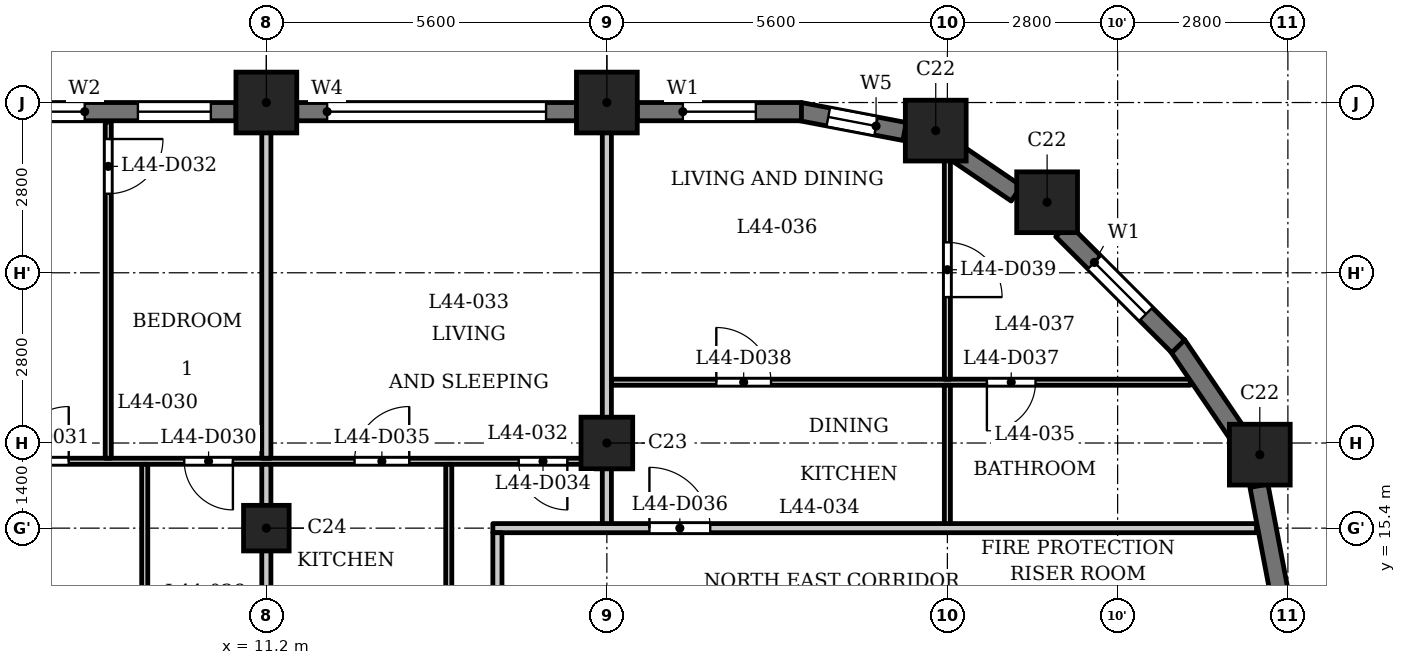
"""IFC4 building model, lengths in metres.
Left out: names, types, materials, properties, quantities, classifications, styles, units other than length and angle.
Written with IfcOpenShell. Run it as: python <this file> out.ifc"""

import sys

from ifc_helpers import new_model, si_unit, direction, frame, frame_2d, origin, origin_2d, place, context, subcontext, project, spatial, rectangle, extrude, element, fill, save


model = new_model("IFC4")
c1 = context("Model", 3, precision=1e-05, world=origin(), true_north=direction((0.0, 1.0)))
c2 = subcontext(c1, "Body", "Model", "MODEL_VIEW")
j1 = project(units=[si_unit("LENGTHUNIT", "METRE"), si_unit("PLANEANGLEUNIT", "RADIAN")], contexts=[c1])
p1 = place(None, origin())
s1 = spatial("IfcSite", under=j1, at=p1, CompositionType="ELEMENT")
p2 = place(p1, origin())
s2 = spatial("IfcBuilding", under=s1, at=p2, CompositionType="ELEMENT")
p3 = place(p2, frame((0.0, 0.0, 171.1)))
s3 = spatial("IfcBuildingStorey", under=s2, at=p3, CompositionType="ELEMENT", Elevation=171.1)
for number, where, z_axis, x_axis in (
    (1, (27.538, 16.609, 0.0), (0.0, 0.0, 1.0), (1.0, 0.0, 0.0)),
    (2, (24.04, 20.76, 0.0), (0.0, 0.0, 1.0), (1.0, 0.0, 0.0)),
    (3, (22.209, 21.938, 0.0), (0.0, 0.0, 1.0), (1.0, 0.0, 0.0)),
    (4, (16.8, 22.4, 0.0), (0.0, 0.0, 1.0), (1.0, 0.0, 0.0)),
    (5, (11.2, 22.4, 0.0), (0.0, 0.0, 1.0), (1.0, 0.0, 0.0)),
):
    element("IfcColumn", number, at=place(p3, frame(where, z_axis=z_axis, x_axis=x_axis)), inside=s3, PredefinedType="COLUMN", context=c2, shape_type="SweptSolid", body=[
        extrude(rectangle(XDim=1.0, YDim=1.0, at=origin_2d()), origin(), (0.0, 0.0, 1.0), 3.5),
    ])
p4 = place(p3, frame((16.8, 16.8, 0.0), z_axis=(0.0, 0.0, 1.0), x_axis=(1.0, 0.0, 0.0)))
e6 = element("IfcColumn", 6, at=p4, inside=s3, PredefinedType="COLUMN", context=c2, shape_type="SweptSolid", body=[
    extrude(rectangle(XDim=0.85, YDim=0.85, at=origin_2d()), origin(), (0.0, 0.0, 1.0), 3.5),
])
p5 = place(p3, frame((11.2, 15.4, 0.0), z_axis=(0.0, 0.0, 1.0), x_axis=(1.0, 0.0, 0.0)))
e7 = element("IfcColumn", 7, at=p5, inside=s3, PredefinedType="COLUMN", context=c2, shape_type="SweptSolid", body=[
    extrude(rectangle(XDim=0.75, YDim=0.75, at=origin_2d()), origin(), (0.0, 0.0, 1.0), 3.5),
])
for number, where, z_axis, x_axis in (
    (8, (27.853, 14.372, 0.0), (0.0, 0.0, 1.0), (-0.187, 0.982, 0.0)),
    (9, (27.166, 16.96, 0.0), (0.0, 0.0, 1.0), (-0.562, 0.827, 0.0)),
):
    element("IfcWall", number, at=place(p3, frame(where, z_axis=z_axis, x_axis=x_axis)), inside=s3, PredefinedType="SOLIDWALL", context=c2, shape_type="SweptSolid", body=[
        extrude(rectangle(XDim=1.756, YDim=0.3, at=frame_2d((0.878, 0.0))), origin(), (0.0, 0.0, 1.0), 2.45),
    ])
p6 = place(p3, frame((26.197, 18.391, 0.0), z_axis=(0.0, 0.0, 1.0), x_axis=(-0.707061571201, 0.707151988282, 0.0)))
e10 = element("IfcWall", 10, at=p6, inside=s3, PredefinedType="SOLIDWALL", context=c2, shape_type="SweptSolid", body=[
    extrude(rectangle(XDim=2.7, YDim=0.3, at=frame_2d((1.35, 0.0))), origin(), (0.0, 0.0, 1.0), 2.45),
])
p7 = place(p6, frame((0.75, 0.0, 0.6)))
e11 = element("IfcOpeningElement", 11, at=p7, cuts=e10, PredefinedType="OPENING", context=c2, shape_type="SweptSolid", body=[
    extrude(rectangle(XDim=1.2, YDim=1.55, at=frame_2d((0.6, 0.775))), frame((0.0, 0.16, 0.0), z_axis=(0.0, -1.0, 0.0), x_axis=(1.0, 0.0, 0.0)), (0.0, 0.0, 1.0), 0.32),
])
p8 = place(p3, frame((23.534, 20.904, 0.0), z_axis=(0.0, 0.0, 1.0), x_axis=(-0.827103906596, 0.56204904385, 0.0)))
e12 = element("IfcWall", 12, at=p8, inside=s3, PredefinedType="SOLIDWALL", context=c2, shape_type="SweptSolid", body=[
    extrude(rectangle(XDim=1.177, YDim=0.3, at=frame_2d((0.589, 0.0))), origin(), (0.0, 0.0, 1.0), 3.2),
])
p9 = place(p3, frame((21.697, 21.924, 0.0), z_axis=(0.0, 0.0, 1.0), x_axis=(-0.982284988433, 0.187393173565, 0.0)))
e13 = element("IfcWall", 13, at=p9, inside=s3, PredefinedType="SOLIDWALL", context=c2, shape_type="SweptSolid", body=[
    extrude(rectangle(XDim=1.756, YDim=0.3, at=frame_2d((0.878, 0.0))), origin(), (0.0, 0.0, 1.0), 2.45),
])
p10 = place(p9, frame((0.478, 0.0, 0.6)))
e14 = element("IfcOpeningElement", 14, at=p10, cuts=e13, PredefinedType="OPENING", context=c2, shape_type="SweptSolid", body=[
    extrude(rectangle(XDim=0.8, YDim=1.55, at=frame_2d((0.4, 0.775))), frame((0.0, 0.16, 0.0), z_axis=(0.0, -1.0, 0.0), x_axis=(1.0, 0.0, 0.0)), (0.0, 0.0, 1.0), 0.32),
])
p11 = place(p3, frame((20.0, 22.25, 0.0), z_axis=(0.0, 0.0, 1.0), x_axis=(-1.0, 0.0, 0.0)))
e15 = element("IfcWall", 15, at=p11, inside=s3, PredefinedType="SOLIDWALL", context=c2, shape_type="SweptSolid", body=[
    extrude(rectangle(XDim=2.7, YDim=0.3, at=frame_2d((1.35, 0.0))), origin(), (0.0, 0.0, 1.0), 2.45),
])
p12 = place(p11, frame((0.75, 0.0, 0.6)))
e16 = element("IfcOpeningElement", 16, at=p12, cuts=e15, PredefinedType="OPENING", context=c2, shape_type="SweptSolid", body=[
    extrude(rectangle(XDim=1.2, YDim=1.55, at=frame_2d((0.6, 0.775))), frame((0.0, 0.16, 0.0), z_axis=(0.0, -1.0, 0.0), x_axis=(1.0, 0.0, 0.0)), (0.0, 0.0, 1.0), 0.32),
])
p13 = place(p3, frame((16.3, 22.25, 0.0), z_axis=(0.0, 0.0, 1.0), x_axis=(-1.0, 0.0, 0.0)))
e17 = element("IfcWall", 17, at=p13, inside=s3, PredefinedType="SOLIDWALL", context=c2, shape_type="SweptSolid", body=[
    extrude(rectangle(XDim=4.6, YDim=0.3, at=frame_2d((2.3, 0.0))), origin(), (0.0, 0.0, 1.0), 2.45),
])
p14 = place(p13, frame((0.5, 0.0, 1.2)))
e18 = element("IfcOpeningElement", 18, at=p14, cuts=e17, PredefinedType="OPENING", context=c2, shape_type="SweptSolid", body=[
    extrude(rectangle(XDim=3.6, YDim=0.95, at=frame_2d((1.8, 0.475))), frame((0.0, 0.16, 0.0), z_axis=(0.0, -1.0, 0.0), x_axis=(1.0, 0.0, 0.0)), (0.0, 0.0, 1.0), 0.32),
])
p15 = place(p3, frame((10.7, 22.25, 0.0), z_axis=(0.0, 0.0, 1.0), x_axis=(-1.0, 0.0, 0.0)))
e19 = element("IfcWall", 19, at=p15, inside=s3, PredefinedType="SOLIDWALL", context=c2, shape_type="SweptSolid", body=[
    extrude(rectangle(XDim=4.6, YDim=0.3, at=frame_2d((2.3, 0.0))), origin(), (0.0, 0.0, 1.0), 2.45),
])
p16 = place(p15, frame((0.413, 0.0, 0.6)))
e20 = element("IfcOpeningElement", 20, at=p16, cuts=e19, PredefinedType="OPENING", context=c2, shape_type="SweptSolid", body=[
    extrude(rectangle(XDim=1.2, YDim=1.55, at=frame_2d((0.6, 0.775))), frame((0.0, 0.16, 0.0), z_axis=(0.0, -1.0, 0.0), x_axis=(1.0, 0.0, 0.0)), (0.0, 0.0, 1.0), 0.32),
])
p17 = place(p15, frame((2.488, 0.0, 0.9)))
e21 = element("IfcOpeningElement", 21, at=p17, cuts=e19, PredefinedType="OPENING", context=c2, shape_type="SweptSolid", body=[
    extrude(rectangle(XDim=1.8, YDim=1.25, at=frame_2d((0.9, 0.625))), frame((0.0, 0.16, 0.0), z_axis=(0.0, -1.0, 0.0), x_axis=(1.0, 0.0, 0.0)), (0.0, 0.0, 1.0), 0.32),
])
p18 = place(p3, frame((14.925, 15.4, 0.0), z_axis=(0.0, 0.0, 1.0), x_axis=(1.0, 0.0, 0.0)))
e22 = element("IfcWall", 22, at=p18, inside=s3, PredefinedType="PARTITIONING", context=c2, shape_type="SweptSolid", body=[
    extrude(rectangle(XDim=12.559, YDim=0.15, at=frame_2d((6.279, 0.0))), origin(), (0.0, 0.0, 1.0), 3.2),
])
p19 = place(p18, frame((2.575, 0.0, 0.0)))
e23 = element("IfcOpeningElement", 23, at=p19, cuts=e22, PredefinedType="OPENING", context=c2, shape_type="SweptSolid", body=[
    extrude(rectangle(XDim=1.0, YDim=2.1, at=frame_2d((0.5, 1.05))), frame((0.0, 0.085, 0.0), z_axis=(0.0, -1.0, 0.0), x_axis=(1.0, 0.0, 0.0)), (0.0, 0.0, 1.0), 0.17),
])
p20 = place(p3, frame((-16.725, 16.5, 0.0), z_axis=(0.0, 0.0, 1.0), x_axis=(1.0, 0.0, 0.0)))
e24 = element("IfcWall", 24, at=p20, inside=s3, PredefinedType="PARTITIONING", context=c2, shape_type="SweptSolid", body=[
    extrude(rectangle(XDim=33.45, YDim=0.1, at=frame_2d((16.725, 0.0))), origin(), (0.0, 0.0, 1.0), 3.2),
])
p21 = place(p20, frame((0.575, 0.0, 0.0)))
e25 = element("IfcOpeningElement", 25, at=p21, cuts=e24, PredefinedType="OPENING", context=c2, shape_type="SweptSolid", body=[
    extrude(rectangle(XDim=0.8, YDim=2.1, at=frame_2d((0.4, 1.05))), frame((0.0, 0.06, 0.0), z_axis=(0.0, -1.0, 0.0), x_axis=(1.0, 0.0, 0.0)), (0.0, 0.0, 1.0), 0.12),
])
p22 = place(p20, frame((3.225, 0.0, 0.0)))
e26 = element("IfcOpeningElement", 26, at=p22, cuts=e24, PredefinedType="OPENING", context=c2, shape_type="SweptSolid", body=[
    extrude(rectangle(XDim=0.9, YDim=2.1, at=frame_2d((0.45, 1.05))), frame((0.0, 0.06, 0.0), z_axis=(0.0, -1.0, 0.0), x_axis=(1.0, 0.0, 0.0)), (0.0, 0.0, 1.0), 0.12),
])
p23 = place(p20, frame((6.775, 0.0, 0.0)))
e27 = element("IfcOpeningElement", 27, at=p23, cuts=e24, PredefinedType="OPENING", context=c2, shape_type="SweptSolid", body=[
    extrude(rectangle(XDim=0.9, YDim=2.1, at=frame_2d((0.45, 1.05))), frame((0.0, 0.06, 0.0), z_axis=(0.0, -1.0, 0.0), x_axis=(1.0, 0.0, 0.0)), (0.0, 0.0, 1.0), 0.12),
])
p24 = place(p20, frame((8.825, 0.0, 0.0)))
e28 = element("IfcOpeningElement", 28, at=p24, cuts=e24, PredefinedType="OPENING", context=c2, shape_type="SweptSolid", body=[
    extrude(rectangle(XDim=0.9, YDim=2.1, at=frame_2d((0.45, 1.05))), frame((0.0, 0.06, 0.0), z_axis=(0.0, -1.0, 0.0), x_axis=(1.0, 0.0, 0.0)), (0.0, 0.0, 1.0), 0.12),
])
p25 = place(p20, frame((20.775, 0.0, 0.0)))
e29 = element("IfcOpeningElement", 29, at=p25, cuts=e24, PredefinedType="OPENING", context=c2, shape_type="SweptSolid", body=[
    extrude(rectangle(XDim=0.8, YDim=2.1, at=frame_2d((0.4, 1.05))), frame((0.0, 0.06, 0.0), z_axis=(0.0, -1.0, 0.0), x_axis=(1.0, 0.0, 0.0)), (0.0, 0.0, 1.0), 0.12),
])
p26 = place(p20, frame((17.325, 0.0, 0.0)))
e30 = element("IfcOpeningElement", 30, at=p26, cuts=e24, PredefinedType="OPENING", context=c2, shape_type="SweptSolid", body=[
    extrude(rectangle(XDim=0.9, YDim=2.1, at=frame_2d((0.45, 1.05))), frame((0.0, 0.06, 0.0), z_axis=(0.0, -1.0, 0.0), x_axis=(1.0, 0.0, 0.0)), (0.0, 0.0, 1.0), 0.12),
])
p27 = place(p20, frame((12.375, 0.0, 0.0)))
e31 = element("IfcOpeningElement", 31, at=p27, cuts=e24, PredefinedType="OPENING", context=c2, shape_type="SweptSolid", body=[
    extrude(rectangle(XDim=0.9, YDim=2.1, at=frame_2d((0.45, 1.05))), frame((0.0, 0.06, 0.0), z_axis=(0.0, -1.0, 0.0), x_axis=(1.0, 0.0, 0.0)), (0.0, 0.0, 1.0), 0.12),
])
p28 = place(p20, frame((14.425, 0.0, 0.0)))
e32 = element("IfcOpeningElement", 32, at=p28, cuts=e24, PredefinedType="OPENING", context=c2, shape_type="SweptSolid", body=[
    extrude(rectangle(XDim=0.9, YDim=2.1, at=frame_2d((0.45, 1.05))), frame((0.0, 0.06, 0.0), z_axis=(0.0, -1.0, 0.0), x_axis=(1.0, 0.0, 0.0)), (0.0, 0.0, 1.0), 0.12),
])
p29 = place(p20, frame((26.575, 0.0, 0.0)))
e33 = element("IfcOpeningElement", 33, at=p29, cuts=e24, PredefinedType="OPENING", context=c2, shape_type="SweptSolid", body=[
    extrude(rectangle(XDim=0.8, YDim=2.1, at=frame_2d((0.4, 1.05))), frame((0.0, 0.06, 0.0), z_axis=(0.0, -1.0, 0.0), x_axis=(1.0, 0.0, 0.0)), (0.0, 0.0, 1.0), 0.12),
])
p30 = place(p20, frame((23.775, 0.0, 0.0)))
e34 = element("IfcOpeningElement", 34, at=p30, cuts=e24, PredefinedType="OPENING", context=c2, shape_type="SweptSolid", body=[
    extrude(rectangle(XDim=0.9, YDim=2.1, at=frame_2d((0.45, 1.05))), frame((0.0, 0.06, 0.0), z_axis=(0.0, -1.0, 0.0), x_axis=(1.0, 0.0, 0.0)), (0.0, 0.0, 1.0), 0.12),
])
p31 = place(p20, frame((32.075, 0.0, 0.0)))
e35 = element("IfcOpeningElement", 35, at=p31, cuts=e24, PredefinedType="OPENING", context=c2, shape_type="SweptSolid", body=[
    extrude(rectangle(XDim=0.8, YDim=2.1, at=frame_2d((0.4, 1.05))), frame((0.0, 0.06, 0.0), z_axis=(0.0, -1.0, 0.0), x_axis=(1.0, 0.0, 0.0)), (0.0, 0.0, 1.0), 0.12),
])
p32 = place(p20, frame((29.375, 0.0, 0.0)))
e36 = element("IfcOpeningElement", 36, at=p32, cuts=e24, PredefinedType="OPENING", context=c2, shape_type="SweptSolid", body=[
    extrude(rectangle(XDim=0.9, YDim=2.1, at=frame_2d((0.45, 1.05))), frame((0.0, 0.06, 0.0), z_axis=(0.0, -1.0, 0.0), x_axis=(1.0, 0.0, 0.0)), (0.0, 0.0, 1.0), 0.12),
])
p33 = place(p3, frame((16.875, 17.8, 0.0), z_axis=(0.0, 0.0, 1.0), x_axis=(1.0, 0.0, 0.0)))
e37 = element("IfcWall", 37, at=p33, inside=s3, PredefinedType="PARTITIONING", context=c2, shape_type="SweptSolid", body=[
    extrude(rectangle(XDim=9.519, YDim=0.1, at=frame_2d((4.76, 0.0))), origin(), (0.0, 0.0, 1.0), 3.2),
])
p34 = place(p33, frame((6.175, 0.0, 0.0)))
e38 = element("IfcOpeningElement", 38, at=p34, cuts=e37, PredefinedType="OPENING", context=c2, shape_type="SweptSolid", body=[
    extrude(rectangle(XDim=0.8, YDim=2.1, at=frame_2d((0.4, 1.05))), frame((0.0, 0.06, 0.0), z_axis=(0.0, -1.0, 0.0), x_axis=(1.0, 0.0, 0.0)), (0.0, 0.0, 1.0), 0.12),
])
p35 = place(p33, frame((1.725, 0.0, 0.0)))
e39 = element("IfcOpeningElement", 39, at=p35, cuts=e37, PredefinedType="OPENING", context=c2, shape_type="SweptSolid", body=[
    extrude(rectangle(XDim=0.9, YDim=2.1, at=frame_2d((0.45, 1.05))), frame((0.0, 0.06, 0.0), z_axis=(0.0, -1.0, 0.0), x_axis=(1.0, 0.0, 0.0)), (0.0, 0.0, 1.0), 0.12),
])
p36 = place(p3, frame((8.6, 16.55, 0.0), z_axis=(0.0, 0.0, 1.0), x_axis=(0.0, 1.0, 0.0)))
e40 = element("IfcWall", 40, at=p36, inside=s3, PredefinedType="PARTITIONING", context=c2, shape_type="SweptSolid", body=[
    extrude(rectangle(XDim=5.53, YDim=0.1, at=frame_2d((2.765, 0.0))), origin(), (0.0, 0.0, 1.0), 3.2),
])
p37 = place(p36, frame((4.35, 0.0, 0.0)))
e41 = element("IfcOpeningElement", 41, at=p37, cuts=e40, PredefinedType="OPENING", context=c2, shape_type="SweptSolid", body=[
    extrude(rectangle(XDim=0.9, YDim=2.1, at=frame_2d((0.45, 1.05))), frame((0.0, 0.06, 0.0), z_axis=(0.0, -1.0, 0.0), x_axis=(1.0, 0.0, 0.0)), (0.0, 0.0, 1.0), 0.12),
])
p38 = place(p3, frame((9.2, 13.275, 0.0), z_axis=(0.0, 0.0, 1.0), x_axis=(0.0, 1.0, 0.0)))
e42 = element("IfcWall", 42, at=p38, inside=s3, PredefinedType="PARTITIONING", context=c2, shape_type="SweptSolid", body=[
    extrude(rectangle(XDim=3.175, YDim=0.1, at=frame_2d((1.587, 0.0))), origin(), (0.0, 0.0, 1.0), 3.2),
])
p39 = place(p3, frame((11.2, 13.275, 0.0), z_axis=(0.0, 0.0, 1.0), x_axis=(0.0, 1.0, 0.0)))
e43 = element("IfcWall", 43, at=p39, inside=s3, PredefinedType="PARTITIONING", context=c2, shape_type="SweptSolid", body=[
    extrude(rectangle(XDim=3.175, YDim=0.15, at=frame_2d((1.587, 0.0))), origin(), (0.0, 0.0, 1.0), 3.2),
])
p40 = place(p3, frame((11.2, 16.55, 0.0), z_axis=(0.0, 0.0, 1.0), x_axis=(0.0, 1.0, 0.0)))
e44 = element("IfcWall", 44, at=p40, inside=s3, PredefinedType="PARTITIONING", context=c2, shape_type="SweptSolid", body=[
    extrude(rectangle(XDim=6.33, YDim=0.15, at=frame_2d((3.165, 0.0))), origin(), (0.0, 0.0, 1.0), 3.2),
])
p41 = place(p3, frame((14.2, 13.275, 0.0), z_axis=(0.0, 0.0, 1.0), x_axis=(0.0, 1.0, 0.0)))
e45 = element("IfcWall", 45, at=p41, inside=s3, PredefinedType="PARTITIONING", context=c2, shape_type="SweptSolid", body=[
    extrude(rectangle(XDim=3.175, YDim=0.1, at=frame_2d((1.587, 0.0))), origin(), (0.0, 0.0, 1.0), 3.2),
])
p42 = place(p3, frame((15.0, 13.275, 0.0), z_axis=(0.0, 0.0, 1.0), x_axis=(0.0, 1.0, 0.0)))
e46 = element("IfcWall", 46, at=p42, inside=s3, PredefinedType="PARTITIONING", context=c2, shape_type="SweptSolid", body=[
    extrude(rectangle(XDim=2.05, YDim=0.15, at=frame_2d((1.025, 0.0))), origin(), (0.0, 0.0, 1.0), 3.2),
])
p43 = place(p3, frame((16.8, 15.475, 0.0), z_axis=(0.0, 0.0, 1.0), x_axis=(0.0, 1.0, 0.0)))
e47 = element("IfcWall", 47, at=p43, inside=s3, PredefinedType="PARTITIONING", context=c2, shape_type="SweptSolid", body=[
    extrude(rectangle(XDim=7.405, YDim=0.15, at=frame_2d((3.702, 0.0))), origin(), (0.0, 0.0, 1.0), 3.2),
])
p44 = place(p3, frame((22.4, 15.475, 0.0), z_axis=(0.0, 0.0, 1.0), x_axis=(0.0, 1.0, 0.0)))
e48 = element("IfcWall", 48, at=p44, inside=s3, PredefinedType="PARTITIONING", context=c2, shape_type="SweptSolid", body=[
    extrude(rectangle(XDim=2.275, YDim=0.1, at=frame_2d((1.137, 0.0))), origin(), (0.0, 0.0, 1.0), 3.2),
])
p45 = place(p3, frame((22.4, 17.85, 0.0), z_axis=(0.0, 0.0, 1.0), x_axis=(0.0, 1.0, 0.0)))
e49 = element("IfcWall", 49, at=p45, inside=s3, PredefinedType="PARTITIONING", context=c2, shape_type="SweptSolid", body=[
    extrude(rectangle(XDim=3.87, YDim=0.1, at=frame_2d((1.935, 0.0))), origin(), (0.0, 0.0, 1.0), 3.2),
])
p46 = place(p45, frame((1.35, 0.0, 0.0)))
e50 = element("IfcOpeningElement", 50, at=p46, cuts=e49, PredefinedType="OPENING", context=c2, shape_type="SweptSolid", body=[
    extrude(rectangle(XDim=0.9, YDim=2.1, at=frame_2d((0.45, 1.05))), frame((0.0, 0.06, 0.0), z_axis=(0.0, -1.0, 0.0), x_axis=(1.0, 0.0, 0.0)), (0.0, 0.0, 1.0), 0.12),
])
p47 = place(p29, origin())
e51 = element("IfcDoor", 51, at=p47, inside=s3, OperationType="SINGLE_SWING_RIGHT", PredefinedType="DOOR", context=c2, shape_type="SweptSolid", body=[
    extrude(rectangle(XDim=0.8, YDim=2.1, at=frame_2d((0.4, 1.05))), frame((0.0, 0.025, 0.0), z_axis=(0.0, -1.0, 0.0), x_axis=(1.0, 0.0, 0.0)), (0.0, 0.0, 1.0), 0.05),
])
fill(e33, e51)
p48 = place(p30, origin())
e52 = element("IfcDoor", 52, at=p48, inside=s3, OperationType="SINGLE_SWING_LEFT", PredefinedType="DOOR", context=c2, shape_type="SweptSolid", body=[
    extrude(rectangle(XDim=0.9, YDim=2.1, at=frame_2d((0.45, 1.05))), frame((0.0, 0.025, 0.0), z_axis=(0.0, -1.0, 0.0), x_axis=(1.0, 0.0, 0.0)), (0.0, 0.0, 1.0), 0.05),
])
fill(e34, e52)
p49 = place(p37, origin())
e53 = element("IfcDoor", 53, at=p49, inside=s3, OperationType="SINGLE_SWING_RIGHT", PredefinedType="DOOR", context=c2, shape_type="SweptSolid", body=[
    extrude(rectangle(XDim=0.9, YDim=2.1, at=frame_2d((0.45, 1.05))), frame((0.0, 0.025, 0.0), z_axis=(0.0, -1.0, 0.0), x_axis=(1.0, 0.0, 0.0)), (0.0, 0.0, 1.0), 0.05),
])
fill(e41, e53)
p50 = place(p31, origin())
e54 = element("IfcDoor", 54, at=p50, inside=s3, OperationType="SINGLE_SWING_RIGHT", PredefinedType="DOOR", context=c2, shape_type="SweptSolid", body=[
    extrude(rectangle(XDim=0.8, YDim=2.1, at=frame_2d((0.4, 1.05))), frame((0.0, 0.025, 0.0), z_axis=(0.0, -1.0, 0.0), x_axis=(1.0, 0.0, 0.0)), (0.0, 0.0, 1.0), 0.05),
])
fill(e35, e54)
p51 = place(p32, origin())
e55 = element("IfcDoor", 55, at=p51, inside=s3, OperationType="SINGLE_SWING_LEFT", PredefinedType="DOOR", context=c2, shape_type="SweptSolid", body=[
    extrude(rectangle(XDim=0.9, YDim=2.1, at=frame_2d((0.45, 1.05))), frame((0.0, 0.025, 0.0), z_axis=(0.0, -1.0, 0.0), x_axis=(1.0, 0.0, 0.0)), (0.0, 0.0, 1.0), 0.05),
])
fill(e36, e55)
p52 = place(p19, origin())
e56 = element("IfcDoor", 56, at=p52, inside=s3, OperationType="SINGLE_SWING_RIGHT", PredefinedType="DOOR", context=c2, shape_type="SweptSolid", body=[
    extrude(rectangle(XDim=1.0, YDim=2.1, at=frame_2d((0.5, 1.05))), frame((0.0, 0.025, 0.0), z_axis=(0.0, -1.0, 0.0), x_axis=(1.0, 0.0, 0.0)), (0.0, 0.0, 1.0), 0.05),
])
fill(e23, e56)
p53 = place(p34, origin())
e57 = element("IfcDoor", 57, at=p53, inside=s3, OperationType="SINGLE_SWING_LEFT", PredefinedType="DOOR", context=c2, shape_type="SweptSolid", body=[
    extrude(rectangle(XDim=0.8, YDim=2.1, at=frame_2d((0.4, 1.05))), frame((0.0, 0.025, 0.0), z_axis=(0.0, -1.0, 0.0), x_axis=(1.0, 0.0, 0.0)), (0.0, 0.0, 1.0), 0.05),
])
fill(e38, e57)
p54 = place(p35, origin())
e58 = element("IfcDoor", 58, at=p54, inside=s3, OperationType="SINGLE_SWING_RIGHT", PredefinedType="DOOR", context=c2, shape_type="SweptSolid", body=[
    extrude(rectangle(XDim=0.9, YDim=2.1, at=frame_2d((0.45, 1.05))), frame((0.0, 0.025, 0.0), z_axis=(0.0, -1.0, 0.0), x_axis=(1.0, 0.0, 0.0)), (0.0, 0.0, 1.0), 0.05),
])
fill(e39, e58)
p55 = place(p46, origin())
e59 = element("IfcDoor", 59, at=p55, inside=s3, OperationType="SINGLE_SWING_LEFT", PredefinedType="DOOR", context=c2, shape_type="SweptSolid", body=[
    extrude(rectangle(XDim=0.9, YDim=2.1, at=frame_2d((0.45, 1.05))), frame((0.0, 0.025, 0.0), z_axis=(0.0, -1.0, 0.0), x_axis=(1.0, 0.0, 0.0)), (0.0, 0.0, 1.0), 0.05),
])
fill(e50, e59)
p56 = place(p7, origin())
e60 = element("IfcWindow", 60, at=p56, inside=s3, PartitioningType="SINGLE_PANEL", PredefinedType="WINDOW", context=c2, shape_type="SweptSolid", body=[
    extrude(rectangle(XDim=1.2, YDim=1.55, at=frame_2d((0.6, 0.775))), frame((0.0, 0.03, 0.0), z_axis=(0.0, -1.0, 0.0), x_axis=(1.0, 0.0, 0.0)), (0.0, 0.0, 1.0), 0.06),
])
fill(e11, e60)
p57 = place(p10, origin())
e61 = element("IfcWindow", 61, at=p57, inside=s3, PartitioningType="SINGLE_PANEL", PredefinedType="WINDOW", context=c2, shape_type="SweptSolid", body=[
    extrude(rectangle(XDim=0.8, YDim=1.55, at=frame_2d((0.4, 0.775))), frame((0.0, 0.03, 0.0), z_axis=(0.0, -1.0, 0.0), x_axis=(1.0, 0.0, 0.0)), (0.0, 0.0, 1.0), 0.06),
])
fill(e14, e61)
p58 = place(p12, origin())
e62 = element("IfcWindow", 62, at=p58, inside=s3, PartitioningType="SINGLE_PANEL", PredefinedType="WINDOW", context=c2, shape_type="SweptSolid", body=[
    extrude(rectangle(XDim=1.2, YDim=1.55, at=frame_2d((0.6, 0.775))), frame((0.0, 0.03, 0.0), z_axis=(0.0, -1.0, 0.0), x_axis=(1.0, 0.0, 0.0)), (0.0, 0.0, 1.0), 0.06),
])
fill(e16, e62)
p59 = place(p14, origin())
e63 = element("IfcWindow", 63, at=p59, inside=s3, PartitioningType="SINGLE_PANEL", PredefinedType="WINDOW", context=c2, shape_type="SweptSolid", body=[
    extrude(rectangle(XDim=3.6, YDim=0.95, at=frame_2d((1.8, 0.475))), frame((0.0, 0.03, 0.0), z_axis=(0.0, -1.0, 0.0), x_axis=(1.0, 0.0, 0.0)), (0.0, 0.0, 1.0), 0.06),
])
fill(e18, e63)
p60 = place(p16, origin())
e64 = element("IfcWindow", 64, at=p60, inside=s3, PartitioningType="SINGLE_PANEL", PredefinedType="WINDOW", context=c2, shape_type="SweptSolid", body=[
    extrude(rectangle(XDim=1.2, YDim=1.55, at=frame_2d((0.6, 0.775))), frame((0.0, 0.03, 0.0), z_axis=(0.0, -1.0, 0.0), x_axis=(1.0, 0.0, 0.0)), (0.0, 0.0, 1.0), 0.06),
])
fill(e20, e64)
p61 = place(p17, origin())
e65 = element("IfcWindow", 65, at=p61, inside=s3, PartitioningType="SINGLE_PANEL", PredefinedType="WINDOW", context=c2, shape_type="SweptSolid", body=[
    extrude(rectangle(XDim=1.8, YDim=1.25, at=frame_2d((0.9, 0.625))), frame((0.0, 0.03, 0.0), z_axis=(0.0, -1.0, 0.0), x_axis=(1.0, 0.0, 0.0)), (0.0, 0.0, 1.0), 0.06),
])
fill(e21, e65)
save(model, sys.argv[1])
